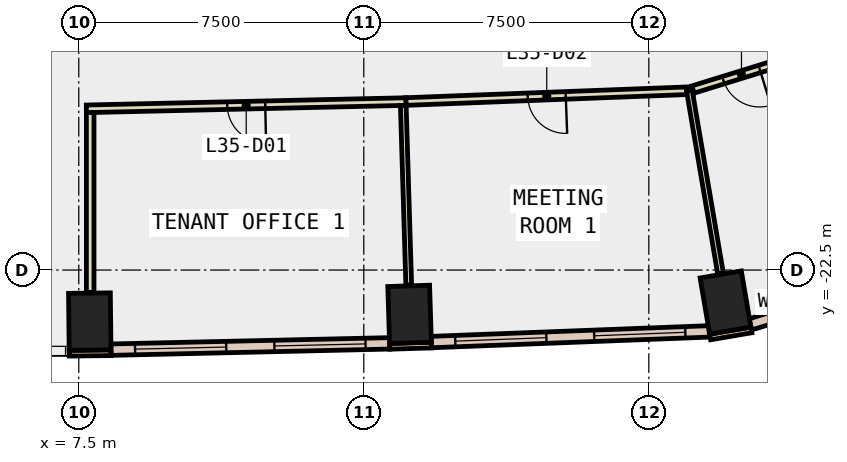
"""IFC4 building model, lengths in metres.
Left out: names, types, materials, properties, quantities, classifications, styles, units other than length and angle.
Written with IfcOpenShell. Run it as: python <this file> out.ifc"""

import sys

from ifc_helpers import new_model, si_unit, direction, frame, frame_2d, origin, origin_2d, place, context, subcontext, project, spatial, rectangle, extrude, element, fill, save


model = new_model("IFC4")
c1 = context("Model", 3, precision=1e-05, world=origin(), true_north=direction((0.0, 1.0)))
c2 = subcontext(c1, "Body", "Model", "MODEL_VIEW")
j1 = project(units=[si_unit("LENGTHUNIT", "METRE"), si_unit("PLANEANGLEUNIT", "RADIAN")], contexts=[c1])
p1 = place(None, origin())
s1 = spatial("IfcSite", under=j1, at=p1, CompositionType="ELEMENT")
p2 = place(p1, origin())
s2 = spatial("IfcBuilding", under=s1, at=p2, CompositionType="ELEMENT")
p3 = place(p2, frame((0.0, 0.0, 159.2)))
s3 = spatial("IfcBuildingStorey", under=s2, at=p3, CompositionType="ELEMENT", Elevation=159.2)
for number, where, z_axis, x_axis in (
    (1, (7.789, -23.857, -0.4), (0.0, 0.0, 1.0), (1.0, 0.012, 0.0)),
    (2, (16.205, -23.666, -0.4), (0.0, 0.0, 1.0), (0.999, 0.032, 0.0)),
    (3, (24.518, -23.355, -0.4), (0.0, 0.0, 1.0), (0.986, 0.168, 0.0)),
):
    element("IfcColumn", number, at=place(p3, frame(where, z_axis=z_axis, x_axis=x_axis)), inside=s3, PredefinedType="COLUMN", context=c2, shape_type="SweptSolid", body=[
        extrude(rectangle(XDim=1.1, YDim=1.5, at=origin_2d()), origin(), (0.0, 0.0, 1.0), 4.2),
    ])
p4 = place(p3, frame((7.249, -24.688, 0.0), z_axis=(0.0, 0.0, 1.0), x_axis=(0.999940879068, 0.010873746799, 0.0)))
e4 = element("IfcWall", 4, at=p4, inside=s3, PredefinedType="STANDARD", context=c2, shape_type="SweptSolid", body=[
    extrude(rectangle(XDim=1.1, YDim=0.15, at=frame_2d((0.55, 0.0))), origin(), (0.0, 0.0, 1.0), 3.8),
])
p5 = place(p3, frame((15.682, -24.508, 0.0), z_axis=(0.0, 0.0, 1.0), x_axis=(0.999523702549, 0.030860460829, 0.0)))
e5 = element("IfcWall", 5, at=p5, inside=s3, PredefinedType="STANDARD", context=c2, shape_type="SweptSolid", body=[
    extrude(rectangle(XDim=1.1, YDim=0.15, at=frame_2d((0.55, 0.0))), origin(), (0.0, 0.0, 1.0), 3.8),
])
p6 = place(p3, frame((24.114, -24.261, 0.0), z_axis=(0.0, 0.0, 1.0), x_axis=(0.985763338892, 0.168138751323, 0.0)))
e6 = element("IfcWall", 6, at=p6, inside=s3, PredefinedType="STANDARD", context=c2, shape_type="SweptSolid", body=[
    extrude(rectangle(XDim=1.101, YDim=0.15, at=frame_2d((0.55, 0.0))), origin(), (0.0, 0.0, 1.0), 3.8),
])
p7 = place(p3, frame((8.347, -24.595, 0.0), z_axis=(0.0, 0.0, 1.0), x_axis=(0.999743825009, 0.022633699594, 0.0)))
e7 = element("IfcWall", 7, at=p7, inside=s3, PredefinedType="STANDARD", context=c2, shape_type="SweptSolid", body=[
    extrude(rectangle(XDim=7.335, YDim=0.3, at=frame_2d((3.667, 0.0))), origin(), (0.0, 0.0, 1.0), 3.8),
])
p8 = place(p7, frame((0.634, 0.0, 0.9)))
e8 = element("IfcOpeningElement", 8, at=p8, cuts=e7, PredefinedType="OPENING", context=c2, shape_type="SweptSolid", body=[
    extrude(rectangle(XDim=2.4, YDim=2.6, at=frame_2d((1.2, 1.3))), frame((0.0, 0.16, 0.0), z_axis=(0.0, -1.0, 0.0), x_axis=(1.0, 0.0, 0.0)), (0.0, 0.0, 1.0), 0.32),
])
p9 = place(p7, frame((4.301, 0.0, 0.9)))
e9 = element("IfcOpeningElement", 9, at=p9, cuts=e7, PredefinedType="OPENING", context=c2, shape_type="SweptSolid", body=[
    extrude(rectangle(XDim=2.4, YDim=2.6, at=frame_2d((1.2, 1.3))), frame((0.0, 0.16, 0.0), z_axis=(0.0, -1.0, 0.0), x_axis=(1.0, 0.0, 0.0)), (0.0, 0.0, 1.0), 0.32),
])
p10 = place(p3, frame((16.778, -24.395, 0.0), z_axis=(0.0, 0.0, 1.0), x_axis=(0.999262356942, 0.038402369711, 0.0)))
e10 = element("IfcWall", 10, at=p10, inside=s3, PredefinedType="STANDARD", context=c2, shape_type="SweptSolid", body=[
    extrude(rectangle(XDim=7.317, YDim=0.3, at=frame_2d((3.659, 0.0))), origin(), (0.0, 0.0, 1.0), 3.8),
])
p11 = place(p10, frame((0.629, 0.0, 0.9)))
e11 = element("IfcOpeningElement", 11, at=p11, cuts=e10, PredefinedType="OPENING", context=c2, shape_type="SweptSolid", body=[
    extrude(rectangle(XDim=2.4, YDim=2.6, at=frame_2d((1.2, 1.3))), frame((0.0, 0.16, 0.0), z_axis=(0.0, -1.0, 0.0), x_axis=(1.0, 0.0, 0.0)), (0.0, 0.0, 1.0), 0.32),
])
p12 = place(p10, frame((4.288, 0.0, 0.9)))
e12 = element("IfcOpeningElement", 12, at=p12, cuts=e10, PredefinedType="OPENING", context=c2, shape_type="SweptSolid", body=[
    extrude(rectangle(XDim=2.4, YDim=2.6, at=frame_2d((1.2, 1.3))), frame((0.0, 0.16, 0.0), z_axis=(0.0, -1.0, 0.0), x_axis=(1.0, 0.0, 0.0)), (0.0, 0.0, 1.0), 0.32),
])
p13 = place(p3, frame((25.173, -23.93, 0.0), z_axis=(0.0, 0.0, 1.0), x_axis=(0.955473661147, 0.295076401723, 0.0)))
e13 = element("IfcWall", 13, at=p13, inside=s3, PredefinedType="STANDARD", context=c2, shape_type="SweptSolid", body=[
    extrude(rectangle(XDim=3.931, YDim=0.3, at=frame_2d((1.965, 0.0))), origin(), (0.0, 0.0, 1.0), 3.8),
])
p14 = place(p13, frame((1.266, 0.0, 0.9)))
e14 = element("IfcOpeningElement", 14, at=p14, cuts=e13, PredefinedType="OPENING", context=c2, shape_type="SweptSolid", body=[
    extrude(rectangle(XDim=1.4, YDim=2.6, at=frame_2d((0.7, 1.3))), frame((0.0, 0.16, 0.0), z_axis=(0.0, -1.0, 0.0), x_axis=(1.0, 0.0, 0.0)), (0.0, 0.0, 1.0), 0.32),
])
p15 = place(p3, frame((16.111, -18.067, 0.0), z_axis=(0.0, 0.0, 1.0), x_axis=(-0.999741835545, -0.022721405353, 0.0)))
e15 = element("IfcWall", 15, at=p15, inside=s3, PredefinedType="PARTITIONING", context=c2, shape_type="SweptSolid", body=[
    extrude(rectangle(XDim=8.413, YDim=0.2, at=frame_2d((4.207, 0.0))), origin(), (0.0, 0.0, 1.0), 3.8),
])
p16 = place(p15, frame((3.706, 0.0, 0.0)))
e16 = element("IfcOpeningElement", 16, at=p16, cuts=e15, PredefinedType="OPENING", context=c2, shape_type="SweptSolid", body=[
    extrude(rectangle(XDim=1.0, YDim=2.1, at=frame_2d((0.5, 1.05))), frame((0.0, 0.11, 0.0), z_axis=(0.0, -1.0, 0.0), x_axis=(1.0, 0.0, 0.0)), (0.0, 0.0, 1.0), 0.22),
])
p17 = place(p3, frame((23.667, -17.776, 0.0), z_axis=(0.0, 0.0, 1.0), x_axis=(-0.999264080977, -0.038357482575, 0.0)))
e17 = element("IfcWall", 17, at=p17, inside=s3, PredefinedType="PARTITIONING", context=c2, shape_type="SweptSolid", body=[
    extrude(rectangle(XDim=7.562, YDim=0.2, at=frame_2d((3.781, 0.0))), origin(), (0.0, 0.0, 1.0), 3.8),
])
p18 = place(p17, frame((3.356, 0.0, 0.0)))
e18 = element("IfcOpeningElement", 18, at=p18, cuts=e17, PredefinedType="OPENING", context=c2, shape_type="SweptSolid", body=[
    extrude(rectangle(XDim=1.0, YDim=2.1, at=frame_2d((0.5, 1.05))), frame((0.0, 0.11, 0.0), z_axis=(0.0, -1.0, 0.0), x_axis=(1.0, 0.0, 0.0)), (0.0, 0.0, 1.0), 0.22),
])
p19 = place(p3, frame((26.213, -16.963, 0.0), z_axis=(0.0, 0.0, 1.0), x_axis=(-0.955509582123, -0.294960062501, 0.0)))
e19 = element("IfcWall", 19, at=p19, inside=s3, PredefinedType="PARTITIONING", context=c2, shape_type="SweptSolid", body=[
    extrude(rectangle(XDim=2.668, YDim=0.2, at=frame_2d((1.334, 0.0))), origin(), (0.0, 0.0, 1.0), 3.8),
])
p20 = place(p19, frame((0.834, 0.0, 0.0)))
e20 = element("IfcOpeningElement", 20, at=p20, cuts=e19, PredefinedType="OPENING", context=c2, shape_type="SweptSolid", body=[
    extrude(rectangle(XDim=1.0, YDim=2.1, at=frame_2d((0.5, 1.05))), frame((0.0, 0.11, 0.0), z_axis=(0.0, -1.0, 0.0), x_axis=(1.0, 0.0, 0.0)), (0.0, 0.0, 1.0), 0.22),
])
p21 = place(p3, frame((7.8, -18.355, 0.0), z_axis=(0.0, 0.0, 1.0), x_axis=(0.0, -1.0, 0.0)))
e21 = element("IfcWall", 21, at=p21, inside=s3, PredefinedType="PARTITIONING", context=c2, shape_type="SweptSolid", body=[
    extrude(rectangle(XDim=4.732, YDim=0.2, at=frame_2d((2.366, 0.0))), origin(), (0.0, 0.0, 1.0), 3.8),
])
p22 = place(p3, frame((16.039, -18.169, 0.0), z_axis=(0.0, 0.0, 1.0), x_axis=(0.030457921157, -0.999536049895, 0.0)))
e22 = element("IfcWall", 22, at=p22, inside=s3, PredefinedType="PARTITIONING", context=c2, shape_type="SweptSolid", body=[
    extrude(rectangle(XDim=4.729, YDim=0.15, at=frame_2d((2.365, 0.0))), origin(), (0.0, 0.0, 1.0), 3.8),
])
p23 = place(p3, frame((23.567, -17.779, 0.0), z_axis=(0.0, 0.0, 1.0), x_axis=(0.168027663896, -0.985782280306, 0.0)))
e23 = element("IfcWall", 23, at=p23, inside=s3, PredefinedType="PARTITIONING", context=c2, shape_type="SweptSolid", body=[
    extrude(rectangle(XDim=4.886, YDim=0.15, at=frame_2d((2.443, 0.0))), origin(), (0.0, 0.0, 1.0), 3.8),
])
p24 = place(p8, origin())
e24 = element("IfcWindow", 24, at=p24, inside=s3, PartitioningType="SINGLE_PANEL", PredefinedType="WINDOW", context=c2, shape_type="SweptSolid", body=[
    extrude(rectangle(XDim=2.4, YDim=2.6, at=frame_2d((1.2, 1.3))), frame((0.0, 0.03, 0.0), z_axis=(0.0, -1.0, 0.0), x_axis=(1.0, 0.0, 0.0)), (0.0, 0.0, 1.0), 0.06),
])
fill(e8, e24)
p25 = place(p9, origin())
e25 = element("IfcWindow", 25, at=p25, inside=s3, PartitioningType="SINGLE_PANEL", PredefinedType="WINDOW", context=c2, shape_type="SweptSolid", body=[
    extrude(rectangle(XDim=2.4, YDim=2.6, at=frame_2d((1.2, 1.3))), frame((0.0, 0.03, 0.0), z_axis=(0.0, -1.0, 0.0), x_axis=(1.0, 0.0, 0.0)), (0.0, 0.0, 1.0), 0.06),
])
fill(e9, e25)
p26 = place(p11, origin())
e26 = element("IfcWindow", 26, at=p26, inside=s3, PartitioningType="SINGLE_PANEL", PredefinedType="WINDOW", context=c2, shape_type="SweptSolid", body=[
    extrude(rectangle(XDim=2.4, YDim=2.6, at=frame_2d((1.2, 1.3))), frame((0.0, 0.03, 0.0), z_axis=(0.0, -1.0, 0.0), x_axis=(1.0, 0.0, 0.0)), (0.0, 0.0, 1.0), 0.06),
])
fill(e11, e26)
p27 = place(p12, origin())
e27 = element("IfcWindow", 27, at=p27, inside=s3, PartitioningType="SINGLE_PANEL", PredefinedType="WINDOW", context=c2, shape_type="SweptSolid", body=[
    extrude(rectangle(XDim=2.4, YDim=2.6, at=frame_2d((1.2, 1.3))), frame((0.0, 0.03, 0.0), z_axis=(0.0, -1.0, 0.0), x_axis=(1.0, 0.0, 0.0)), (0.0, 0.0, 1.0), 0.06),
])
fill(e12, e27)
p28 = place(p16, origin())
e28 = element("IfcDoor", 28, at=p28, inside=s3, OperationType="SINGLE_SWING_RIGHT", PredefinedType="DOOR", context=c2, shape_type="SweptSolid", body=[
    extrude(rectangle(XDim=1.0, YDim=2.1, at=frame_2d((0.5, 1.05))), frame((0.0, 0.025, 0.0), z_axis=(0.0, -1.0, 0.0), x_axis=(1.0, 0.0, 0.0)), (0.0, 0.0, 1.0), 0.05),
])
fill(e16, e28)
p29 = place(p18, origin())
e29 = element("IfcDoor", 29, at=p29, inside=s3, OperationType="SINGLE_SWING_LEFT", PredefinedType="DOOR", context=c2, shape_type="SweptSolid", body=[
    extrude(rectangle(XDim=1.0, YDim=2.1, at=frame_2d((0.5, 1.05))), frame((0.0, 0.025, 0.0), z_axis=(0.0, -1.0, 0.0), x_axis=(1.0, 0.0, 0.0)), (0.0, 0.0, 1.0), 0.05),
])
fill(e18, e29)
p30 = place(p20, origin())
e30 = element("IfcDoor", 30, at=p30, inside=s3, OperationType="SINGLE_SWING_LEFT", PredefinedType="DOOR", context=c2, shape_type="SweptSolid", body=[
    extrude(rectangle(XDim=1.0, YDim=2.1, at=frame_2d((0.5, 1.05))), frame((0.0, 0.025, 0.0), z_axis=(0.0, -1.0, 0.0), x_axis=(1.0, 0.0, 0.0)), (0.0, 0.0, 1.0), 0.05),
])
fill(e20, e30)
save(model, sys.argv[1])
